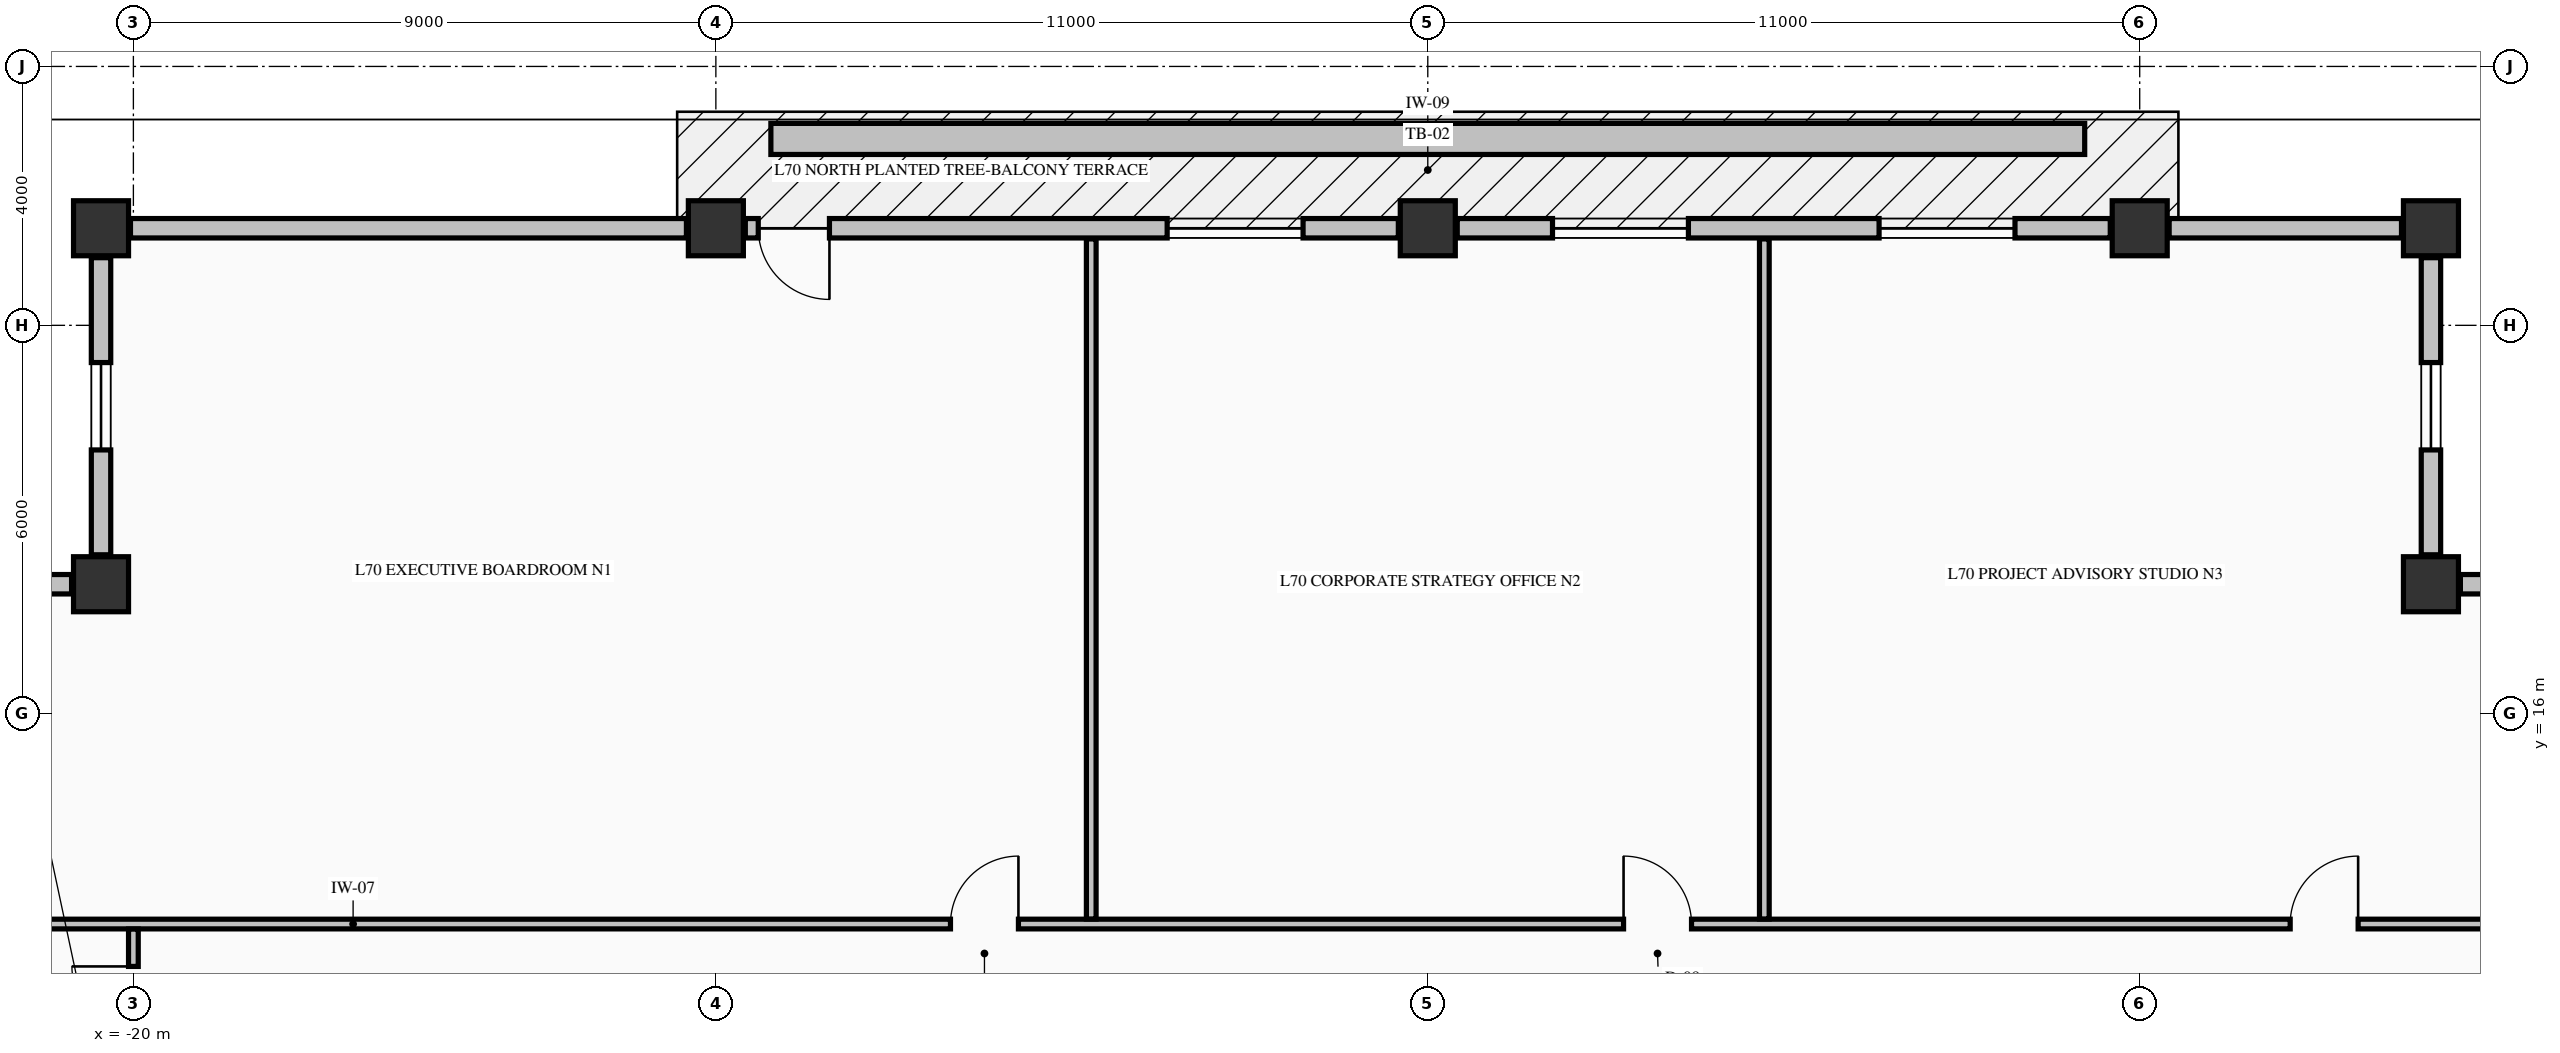
"""IFC4 building model, lengths in metres.
Left out: names, types, materials, properties, quantities, classifications, styles, units other than length and angle.
Written with IfcOpenShell. Run it as: python <this file> out.ifc"""

import sys

from ifc_helpers import new_model, si_unit, direction, frame, frame_2d, origin, origin_2d, place, context, subcontext, project, spatial, rectangle, extrude, element, fill, save


model = new_model("IFC4")
c1 = context("Model", 3, precision=1e-05, world=origin(), true_north=direction((0.0, 1.0)))
c2 = subcontext(c1, "Body", "Model", "MODEL_VIEW")
j1 = project(units=[si_unit("LENGTHUNIT", "METRE"), si_unit("PLANEANGLEUNIT", "RADIAN")], contexts=[c1])
p1 = place(None, origin())
s1 = spatial("IfcSite", under=j1, at=p1, CompositionType="ELEMENT")
p2 = place(p1, origin())
s2 = spatial("IfcBuilding", under=s1, at=p2, CompositionType="ELEMENT")
p3 = place(p2, frame((0.0, 0.0, 264.12)))
s3 = spatial("IfcBuildingStorey", under=s2, at=p3, CompositionType="ELEMENT", Elevation=264.12)
for number, where, z_axis, x_axis in (
    (1, (-20.5, 23.5, -0.25), (0.0, 0.0, 1.0), (1.0, 0.0, 0.0)),
    (2, (-11.0, 23.5, -0.25), (0.0, 0.0, 1.0), (1.0, 0.0, 0.0)),
    (3, (0.0, 23.5, -0.25), (0.0, 0.0, 1.0), (1.0, 0.0, 0.0)),
    (4, (11.0, 23.5, -0.25), (0.0, 0.0, 1.0), (1.0, 0.0, 0.0)),
    (5, (15.5, 23.5, -0.25), (0.0, 0.0, 1.0), (1.0, 0.0, 0.0)),
    (6, (15.5, 18.0, -0.25), (0.0, 0.0, 1.0), (1.0, 0.0, 0.0)),
    (7, (-20.5, 18.0, -0.25), (0.0, 0.0, 1.0), (1.0, 0.0, 0.0)),
):
    element("IfcColumn", number, at=place(p3, frame(where, z_axis=z_axis, x_axis=x_axis)), inside=s3, PredefinedType="COLUMN", context=c2, shape_type="SweptSolid", body=[
        extrude(rectangle(XDim=0.85, YDim=0.85, at=origin_2d()), origin(), (0.0, 0.0, 1.0), 3.23),
    ])
p4 = place(p3, frame((20.545, 18.0, 0.0), z_axis=(0.0, 0.0, 1.0), x_axis=(-1.0, 0.0, 0.0)))
e8 = element("IfcWall", 8, at=p4, inside=s3, PredefinedType="STANDARD", context=c2, shape_type="SweptSolid", body=[
    extrude(rectangle(XDim=4.59, YDim=0.3, at=frame_2d((2.295, 0.0))), origin(), (0.0, 0.0, 1.0), 2.372),
])
p5 = place(p4, frame((1.62, 0.0, 0.68)))
e9 = element("IfcOpeningElement", 9, at=p5, cuts=e8, PredefinedType="OPENING", context=c2, shape_type="SweptSolid", body=[
    extrude(rectangle(XDim=1.35, YDim=1.42, at=frame_2d((0.675, 0.71))), frame((0.0, 0.16, 0.0), z_axis=(0.0, -1.0, 0.0), x_axis=(1.0, 0.0, 0.0)), (0.0, 0.0, 1.0), 0.32),
])
p6 = place(p3, frame((15.5, 18.455, 0.0), z_axis=(0.0, 0.0, 1.0), x_axis=(0.0, 1.0, 0.0)))
e10 = element("IfcWall", 10, at=p6, inside=s3, PredefinedType="STANDARD", context=c2, shape_type="SweptSolid", body=[
    extrude(rectangle(XDim=4.59, YDim=0.3, at=frame_2d((2.295, 0.0))), origin(), (0.0, 0.0, 1.0), 2.372),
])
p7 = place(p6, frame((1.62, 0.0, 0.68)))
e11 = element("IfcOpeningElement", 11, at=p7, cuts=e10, PredefinedType="OPENING", context=c2, shape_type="SweptSolid", body=[
    extrude(rectangle(XDim=1.35, YDim=1.42, at=frame_2d((0.675, 0.71))), frame((0.0, 0.16, 0.0), z_axis=(0.0, -1.0, 0.0), x_axis=(1.0, 0.0, 0.0)), (0.0, 0.0, 1.0), 0.32),
])
p8 = place(p3, frame((-20.5, 23.045, 0.0), z_axis=(0.0, 0.0, 1.0), x_axis=(0.0, -1.0, 0.0)))
e12 = element("IfcWall", 12, at=p8, inside=s3, PredefinedType="STANDARD", context=c2, shape_type="SweptSolid", body=[
    extrude(rectangle(XDim=4.59, YDim=0.3, at=frame_2d((2.295, 0.0))), origin(), (0.0, 0.0, 1.0), 2.372),
])
p9 = place(p8, frame((1.62, 0.0, 0.68)))
e13 = element("IfcOpeningElement", 13, at=p9, cuts=e12, PredefinedType="OPENING", context=c2, shape_type="SweptSolid", body=[
    extrude(rectangle(XDim=1.35, YDim=1.42, at=frame_2d((0.675, 0.71))), frame((0.0, 0.16, 0.0), z_axis=(0.0, -1.0, 0.0), x_axis=(1.0, 0.0, 0.0)), (0.0, 0.0, 1.0), 0.32),
])
p10 = place(p3, frame((-20.955, 18.0, 0.0), z_axis=(0.0, 0.0, 1.0), x_axis=(-1.0, 0.0, 0.0)))
e14 = element("IfcWall", 14, at=p10, inside=s3, PredefinedType="STANDARD", context=c2, shape_type="SweptSolid", body=[
    extrude(rectangle(XDim=4.59, YDim=0.3, at=frame_2d((2.295, 0.0))), origin(), (0.0, 0.0, 1.0), 2.372),
])
p11 = place(p10, frame((1.62, 0.0, 0.68)))
e15 = element("IfcOpeningElement", 15, at=p11, cuts=e14, PredefinedType="OPENING", context=c2, shape_type="SweptSolid", body=[
    extrude(rectangle(XDim=1.35, YDim=1.42, at=frame_2d((0.675, 0.71))), frame((0.0, 0.16, 0.0), z_axis=(0.0, -1.0, 0.0), x_axis=(1.0, 0.0, 0.0)), (0.0, 0.0, 1.0), 0.32),
])
p12 = place(p3, frame((-11.455, 23.5, 0.0), z_axis=(0.0, 0.0, 1.0), x_axis=(-1.0, 0.0, 0.0)))
e16 = element("IfcWall", 16, at=p12, inside=s3, PredefinedType="STANDARD", context=c2, shape_type="SweptSolid", body=[
    extrude(rectangle(XDim=8.59, YDim=0.3, at=frame_2d((4.295, 0.0))), origin(), (0.0, 0.0, 1.0), 2.372),
])
p13 = place(p3, frame((-0.455, 23.5, 0.0), z_axis=(0.0, 0.0, 1.0), x_axis=(-1.0, 0.0, 0.0)))
e17 = element("IfcWall", 17, at=p13, inside=s3, PredefinedType="STANDARD", context=c2, shape_type="SweptSolid", body=[
    extrude(rectangle(XDim=10.09, YDim=0.3, at=frame_2d((5.045, 0.0))), origin(), (0.0, 0.0, 1.0), 2.372),
])
p14 = place(p13, frame((8.79, 0.0, 0.0)))
e18 = element("IfcOpeningElement", 18, at=p14, cuts=e17, PredefinedType="OPENING", context=c2, shape_type="SweptSolid", body=[
    extrude(rectangle(XDim=1.1, YDim=2.15, at=frame_2d((0.55, 1.075))), frame((0.0, 0.16, 0.0), z_axis=(0.0, -1.0, 0.0), x_axis=(1.0, 0.0, 0.0)), (0.0, 0.0, 1.0), 0.32),
])
p15 = place(p13, frame((1.472, 0.0, 0.7)))
e19 = element("IfcOpeningElement", 19, at=p15, cuts=e17, PredefinedType="OPENING", context=c2, shape_type="SweptSolid", body=[
    extrude(rectangle(XDim=2.1, YDim=1.5, at=frame_2d((1.05, 0.75))), frame((0.0, 0.16, 0.0), z_axis=(0.0, -1.0, 0.0), x_axis=(1.0, 0.0, 0.0)), (0.0, 0.0, 1.0), 0.32),
])
p16 = place(p3, frame((10.545, 23.5, 0.0), z_axis=(0.0, 0.0, 1.0), x_axis=(-1.0, 0.0, 0.0)))
e20 = element("IfcWall", 20, at=p16, inside=s3, PredefinedType="STANDARD", context=c2, shape_type="SweptSolid", body=[
    extrude(rectangle(XDim=10.09, YDim=0.3, at=frame_2d((5.045, 0.0))), origin(), (0.0, 0.0, 1.0), 2.372),
])
p17 = place(p16, frame((1.472, 0.0, 0.7)))
e21 = element("IfcOpeningElement", 21, at=p17, cuts=e20, PredefinedType="OPENING", context=c2, shape_type="SweptSolid", body=[
    extrude(rectangle(XDim=2.1, YDim=1.5, at=frame_2d((1.05, 0.75))), frame((0.0, 0.16, 0.0), z_axis=(0.0, -1.0, 0.0), x_axis=(1.0, 0.0, 0.0)), (0.0, 0.0, 1.0), 0.32),
])
p18 = place(p16, frame((6.518, 0.0, 0.7)))
e22 = element("IfcOpeningElement", 22, at=p18, cuts=e20, PredefinedType="OPENING", context=c2, shape_type="SweptSolid", body=[
    extrude(rectangle(XDim=2.1, YDim=1.5, at=frame_2d((1.05, 0.75))), frame((0.0, 0.16, 0.0), z_axis=(0.0, -1.0, 0.0), x_axis=(1.0, 0.0, 0.0)), (0.0, 0.0, 1.0), 0.32),
])
p19 = place(p3, frame((15.045, 23.5, 0.0), z_axis=(0.0, 0.0, 1.0), x_axis=(-1.0, 0.0, 0.0)))
e23 = element("IfcWall", 23, at=p19, inside=s3, PredefinedType="STANDARD", context=c2, shape_type="SweptSolid", body=[
    extrude(rectangle(XDim=3.59, YDim=0.3, at=frame_2d((1.795, 0.0))), origin(), (0.0, 0.0, 1.0), 2.372),
])
p20 = place(p3, frame((-25.835, 12.75, 0.0), z_axis=(0.0, 0.0, 1.0), x_axis=(1.0, 0.0, 0.0)))
e24 = element("IfcWall", 24, at=p20, inside=s3, PredefinedType="PARTITIONING", context=c2, shape_type="SweptSolid", body=[
    extrude(rectangle(XDim=45.91, YDim=0.15, at=frame_2d((22.955, 0.0))), origin(), (0.0, 0.0, 1.0), 2.98),
])
p21 = place(p20, frame((18.46, 0.0, 0.0)))
e25 = element("IfcOpeningElement", 25, at=p21, cuts=e24, PredefinedType="OPENING", context=c2, shape_type="SweptSolid", body=[
    extrude(rectangle(XDim=1.05, YDim=2.15, at=frame_2d((0.525, 1.075))), frame((0.0, 0.085, 0.0), z_axis=(0.0, -1.0, 0.0), x_axis=(1.0, 0.0, 0.0)), (0.0, 0.0, 1.0), 0.17),
])
p22 = place(p20, frame((28.86, 0.0, 0.0)))
e26 = element("IfcOpeningElement", 26, at=p22, cuts=e24, PredefinedType="OPENING", context=c2, shape_type="SweptSolid", body=[
    extrude(rectangle(XDim=1.05, YDim=2.15, at=frame_2d((0.525, 1.075))), frame((0.0, 0.085, 0.0), z_axis=(0.0, -1.0, 0.0), x_axis=(1.0, 0.0, 0.0)), (0.0, 0.0, 1.0), 0.17),
])
p23 = place(p20, frame((39.16, 0.0, 0.0)))
e27 = element("IfcOpeningElement", 27, at=p23, cuts=e24, PredefinedType="OPENING", context=c2, shape_type="SweptSolid", body=[
    extrude(rectangle(XDim=1.05, YDim=2.15, at=frame_2d((0.525, 1.075))), frame((0.0, 0.085, 0.0), z_axis=(0.0, -1.0, 0.0), x_axis=(1.0, 0.0, 0.0)), (0.0, 0.0, 1.0), 0.17),
])
p24 = place(p3, frame((-20.0, 10.856, 0.0), z_axis=(0.0, 0.0, 1.0), x_axis=(0.0, 1.0, 0.0)))
e28 = element("IfcWall", 28, at=p24, inside=s3, PredefinedType="PARTITIONING", context=c2, shape_type="SweptSolid", body=[
    extrude(rectangle(XDim=1.816, YDim=0.15, at=frame_2d((0.908, 0.0))), origin(), (0.0, 0.0, 1.0), 2.98),
])
p25 = place(p24, frame((0.289, 0.0, 0.0)))
e29 = element("IfcOpeningElement", 29, at=p25, cuts=e28, PredefinedType="OPENING", context=c2, shape_type="SweptSolid", body=[
    extrude(rectangle(XDim=0.95, YDim=2.15, at=frame_2d((0.475, 1.075))), frame((0.0, 0.085, 0.0), z_axis=(0.0, -1.0, 0.0), x_axis=(1.0, 0.0, 0.0)), (0.0, 0.0, 1.0), 0.17),
])
for number, where, z_axis, x_axis in (
    (30, (-5.2, 12.828, 0.0), (0.0, 0.0, 1.0), (0.0, 1.0, 0.0)),
    (31, (5.2, 12.828, 0.0), (0.0, 0.0, 1.0), (0.0, 1.0, 0.0)),
):
    element("IfcWall", number, at=place(p3, frame(where, z_axis=z_axis, x_axis=x_axis)), inside=s3, PredefinedType="PARTITIONING", context=c2, shape_type="SweptSolid", body=[
        extrude(rectangle(XDim=10.507, YDim=0.15, at=frame_2d((5.253, 0.0))), origin(), (0.0, 0.0, 1.0), 2.98),
    ])
p26 = place(p3, frame((-10.15, 24.88, -0.04), z_axis=(0.0, 0.0, 1.0), x_axis=(1.0, 0.0, 0.0)))
e32 = element("IfcWall", 32, at=p26, inside=s3, PredefinedType="PARAPET", context=c2, shape_type="SweptSolid", body=[
    extrude(rectangle(XDim=20.3, YDim=0.48, at=frame_2d((10.15, 0.0))), origin(), (0.0, 0.0, 1.0), 0.52),
])
p27 = place(p7, origin())
e33 = element("IfcWindow", 33, at=p27, inside=s3, PartitioningType="SINGLE_PANEL", PredefinedType="WINDOW", context=c2, shape_type="SweptSolid", body=[
    extrude(rectangle(XDim=1.35, YDim=1.42, at=frame_2d((0.675, 0.71))), frame((0.0, 0.03, 0.0), z_axis=(0.0, -1.0, 0.0), x_axis=(1.0, 0.0, 0.0)), (0.0, 0.0, 1.0), 0.06),
])
fill(e11, e33)
p28 = place(p9, origin())
e34 = element("IfcWindow", 34, at=p28, inside=s3, PartitioningType="SINGLE_PANEL", PredefinedType="WINDOW", context=c2, shape_type="SweptSolid", body=[
    extrude(rectangle(XDim=1.35, YDim=1.42, at=frame_2d((0.675, 0.71))), frame((0.0, 0.03, 0.0), z_axis=(0.0, -1.0, 0.0), x_axis=(1.0, 0.0, 0.0)), (0.0, 0.0, 1.0), 0.06),
])
fill(e13, e34)
p29 = place(p14, origin())
e35 = element("IfcDoor", 35, at=p29, inside=s3, OperationType="SINGLE_SWING_LEFT", PredefinedType="DOOR", context=c2, shape_type="SweptSolid", body=[
    extrude(rectangle(XDim=1.1, YDim=2.15, at=frame_2d((0.55, 1.075))), frame((0.0, 0.025, 0.0), z_axis=(0.0, -1.0, 0.0), x_axis=(1.0, 0.0, 0.0)), (0.0, 0.0, 1.0), 0.05),
])
fill(e18, e35)
p30 = place(p15, origin())
e36 = element("IfcWindow", 36, at=p30, inside=s3, PartitioningType="SINGLE_PANEL", PredefinedType="WINDOW", context=c2, shape_type="SweptSolid", body=[
    extrude(rectangle(XDim=2.1, YDim=1.5, at=frame_2d((1.05, 0.75))), frame((0.0, 0.03, 0.0), z_axis=(0.0, -1.0, 0.0), x_axis=(1.0, 0.0, 0.0)), (0.0, 0.0, 1.0), 0.06),
])
fill(e19, e36)
p31 = place(p17, origin())
e37 = element("IfcWindow", 37, at=p31, inside=s3, PartitioningType="SINGLE_PANEL", PredefinedType="WINDOW", context=c2, shape_type="SweptSolid", body=[
    extrude(rectangle(XDim=2.1, YDim=1.5, at=frame_2d((1.05, 0.75))), frame((0.0, 0.03, 0.0), z_axis=(0.0, -1.0, 0.0), x_axis=(1.0, 0.0, 0.0)), (0.0, 0.0, 1.0), 0.06),
])
fill(e21, e37)
p32 = place(p18, origin())
e38 = element("IfcWindow", 38, at=p32, inside=s3, PartitioningType="SINGLE_PANEL", PredefinedType="WINDOW", context=c2, shape_type="SweptSolid", body=[
    extrude(rectangle(XDim=2.1, YDim=1.5, at=frame_2d((1.05, 0.75))), frame((0.0, 0.03, 0.0), z_axis=(0.0, -1.0, 0.0), x_axis=(1.0, 0.0, 0.0)), (0.0, 0.0, 1.0), 0.06),
])
fill(e22, e38)
p33 = place(p21, origin())
e39 = element("IfcDoor", 39, at=p33, inside=s3, OperationType="SINGLE_SWING_RIGHT", PredefinedType="DOOR", context=c2, shape_type="SweptSolid", body=[
    extrude(rectangle(XDim=1.05, YDim=2.15, at=frame_2d((0.525, 1.075))), frame((0.0, 0.025, 0.0), z_axis=(0.0, -1.0, 0.0), x_axis=(1.0, 0.0, 0.0)), (0.0, 0.0, 1.0), 0.05),
])
fill(e25, e39)
p34 = place(p22, origin())
e40 = element("IfcDoor", 40, at=p34, inside=s3, OperationType="SINGLE_SWING_LEFT", PredefinedType="DOOR", context=c2, shape_type="SweptSolid", body=[
    extrude(rectangle(XDim=1.05, YDim=2.15, at=frame_2d((0.525, 1.075))), frame((0.0, 0.025, 0.0), z_axis=(0.0, -1.0, 0.0), x_axis=(1.0, 0.0, 0.0)), (0.0, 0.0, 1.0), 0.05),
])
fill(e26, e40)
p35 = place(p23, origin())
e41 = element("IfcDoor", 41, at=p35, inside=s3, OperationType="SINGLE_SWING_RIGHT", PredefinedType="DOOR", context=c2, shape_type="SweptSolid", body=[
    extrude(rectangle(XDim=1.05, YDim=2.15, at=frame_2d((0.525, 1.075))), frame((0.0, 0.025, 0.0), z_axis=(0.0, -1.0, 0.0), x_axis=(1.0, 0.0, 0.0)), (0.0, 0.0, 1.0), 0.05),
])
fill(e27, e41)
p36 = place(p25, origin())
e42 = element("IfcDoor", 42, at=p36, inside=s3, OperationType="SINGLE_SWING_RIGHT", PredefinedType="DOOR", context=c2, shape_type="SweptSolid", body=[
    extrude(rectangle(XDim=0.95, YDim=2.15, at=frame_2d((0.475, 1.075))), frame((0.0, 0.025, 0.0), z_axis=(0.0, -1.0, 0.0), x_axis=(1.0, 0.0, 0.0)), (0.0, 0.0, 1.0), 0.05),
])
fill(e29, e42)
save(model, sys.argv[1])
